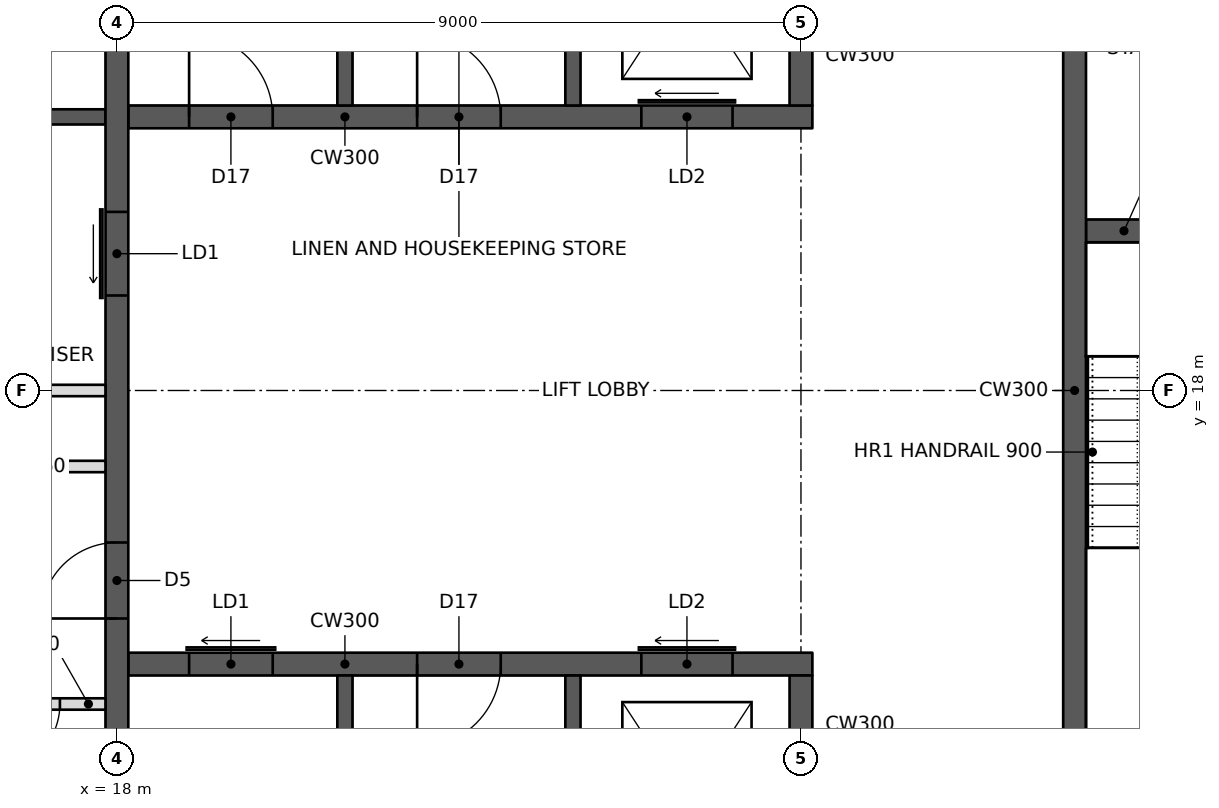
"""IFC4 building model, lengths in metres.
Left out: names, types, materials, properties, quantities, classifications, styles, units other than length and angle.
Written with IfcOpenShell. Run it as: python <this file> out.ifc"""

import sys

from ifc_helpers import new_model, si_unit, direction, frame, frame_2d, origin, place, context, subcontext, project, spatial, rectangle, extrude, element, fill, save


model = new_model("IFC4")
c1 = context("Model", 3, precision=1e-05, world=origin(), true_north=direction((0.0, 1.0)))
c2 = subcontext(c1, "Body", "Model", "MODEL_VIEW")
j1 = project(units=[si_unit("LENGTHUNIT", "METRE"), si_unit("PLANEANGLEUNIT", "RADIAN")], contexts=[c1])
p1 = place(None, origin())
s1 = spatial("IfcSite", under=j1, at=p1, CompositionType="ELEMENT")
p2 = place(p1, origin())
s2 = spatial("IfcBuilding", under=s1, at=p2, CompositionType="ELEMENT")
p3 = place(p2, frame((0.0, 0.0, 211.4)))
s3 = spatial("IfcBuildingStorey", under=s2, at=p3, CompositionType="ELEMENT", Elevation=211.4)
p4 = place(p3, frame((18.0, 11.4, 0.0), z_axis=(0.0, 0.0, 1.0), x_axis=(0.0, 1.0, 0.0)))
e1 = element("IfcWall", 1, at=p4, inside=s3, PredefinedType="SHEAR", context=c2, shape_type="SweptSolid", body=[
    extrude(rectangle(XDim=13.2, YDim=0.3, at=frame_2d((6.6, 0.0))), origin(), (0.0, 0.0, 1.0), 3.4),
])
p5 = place(p4, frame((3.6, 0.0, 0.0)))
e2 = element("IfcOpeningElement", 2, at=p5, cuts=e1, PredefinedType="OPENING", context=c2, shape_type="SweptSolid", body=[
    extrude(rectangle(XDim=1.0, YDim=2.1, at=frame_2d((0.5, 1.05))), frame((0.0, 0.16, 0.0), z_axis=(0.0, -1.0, 0.0), x_axis=(1.0, 0.0, 0.0)), (0.0, 0.0, 1.0), 0.32),
])
p6 = place(p4, frame((7.85, 0.0, 0.0)))
e3 = element("IfcOpeningElement", 3, at=p6, cuts=e1, PredefinedType="OPENING", context=c2, shape_type="SweptSolid", body=[
    extrude(rectangle(XDim=1.1, YDim=2.1, at=frame_2d((0.55, 1.05))), frame((0.0, 0.16, 0.0), z_axis=(0.0, -1.0, 0.0), x_axis=(1.0, 0.0, 0.0)), (0.0, 0.0, 1.0), 0.32),
])
p7 = place(p3, frame((14.55, 18.0, 0.0), z_axis=(0.0, 0.0, 1.0), x_axis=(1.0, 0.0, 0.0)))
e4 = element("IfcWall", 4, at=p7, inside=s3, PredefinedType="PARTITIONING", context=c2, shape_type="SweptSolid", body=[
    extrude(rectangle(XDim=3.3, YDim=0.15, at=frame_2d((1.65, 0.0))), origin(), (0.0, 0.0, 1.0), 3.2),
])
p8 = place(p3, frame((18.15, 14.4, 0.0), z_axis=(0.0, 0.0, 1.0), x_axis=(1.0, 0.0, 0.0)))
e5 = element("IfcWall", 5, at=p8, inside=s3, PredefinedType="SHEAR", context=c2, shape_type="SweptSolid", body=[
    extrude(rectangle(XDim=9.0, YDim=0.3, at=frame_2d((4.5, 0.0))), origin(), (0.0, 0.0, 1.0), 3.4),
])
p9 = place(p8, frame((0.8, 0.0, 0.0)))
e6 = element("IfcOpeningElement", 6, at=p9, cuts=e5, PredefinedType="OPENING", context=c2, shape_type="SweptSolid", body=[
    extrude(rectangle(XDim=1.1, YDim=2.1, at=frame_2d((0.55, 1.05))), frame((0.0, 0.16, 0.0), z_axis=(0.0, -1.0, 0.0), x_axis=(1.0, 0.0, 0.0)), (0.0, 0.0, 1.0), 0.32),
])
p10 = place(p8, frame((6.75, 0.0, 0.0)))
e7 = element("IfcOpeningElement", 7, at=p10, cuts=e5, PredefinedType="OPENING", context=c2, shape_type="SweptSolid", body=[
    extrude(rectangle(XDim=1.2, YDim=2.1, at=frame_2d((0.6, 1.05))), frame((0.0, 0.16, 0.0), z_axis=(0.0, -1.0, 0.0), x_axis=(1.0, 0.0, 0.0)), (0.0, 0.0, 1.0), 0.32),
])
p11 = place(p8, frame((3.8, 0.0, 0.0)))
e8 = element("IfcOpeningElement", 8, at=p11, cuts=e5, PredefinedType="OPENING", context=c2, shape_type="SweptSolid", body=[
    extrude(rectangle(XDim=1.1, YDim=2.1, at=frame_2d((0.55, 1.05))), frame((0.0, 0.16, 0.0), z_axis=(0.0, -1.0, 0.0), x_axis=(1.0, 0.0, 0.0)), (0.0, 0.0, 1.0), 0.32),
])
p12 = place(p3, frame((27.0, 11.4, 0.0), z_axis=(0.0, 0.0, 1.0), x_axis=(0.0, 1.0, 0.0)))
e9 = element("IfcWall", 9, at=p12, inside=s3, PredefinedType="SHEAR", context=c2, shape_type="SweptSolid", body=[
    extrude(rectangle(XDim=2.85, YDim=0.3, at=frame_2d((1.425, 0.0))), origin(), (0.0, 0.0, 1.0), 3.4),
])
for number, where, z_axis, x_axis in (
    (10, (21.0, 11.4, 0.0), (0.0, 0.0, 1.0), (0.0, 1.0, 0.0)),
    (11, (24.0, 11.4, 0.0), (0.0, 0.0, 1.0), (0.0, 1.0, 0.0)),
):
    element("IfcWall", number, at=place(p3, frame(where, z_axis=z_axis, x_axis=x_axis)), inside=s3, PredefinedType="SHEAR", context=c2, shape_type="SweptSolid", body=[
        extrude(rectangle(XDim=2.85, YDim=0.2, at=frame_2d((1.425, 0.0))), origin(), (0.0, 0.0, 1.0), 3.4),
    ])
p13 = place(p3, frame((18.15, 21.6, 0.0), z_axis=(0.0, 0.0, 1.0), x_axis=(1.0, 0.0, 0.0)))
e12 = element("IfcWall", 12, at=p13, inside=s3, PredefinedType="SHEAR", context=c2, shape_type="SweptSolid", body=[
    extrude(rectangle(XDim=9.0, YDim=0.3, at=frame_2d((4.5, 0.0))), origin(), (0.0, 0.0, 1.0), 3.4),
])
p14 = place(p13, frame((6.75, 0.0, 0.0)))
e13 = element("IfcOpeningElement", 13, at=p14, cuts=e12, PredefinedType="OPENING", context=c2, shape_type="SweptSolid", body=[
    extrude(rectangle(XDim=1.2, YDim=2.1, at=frame_2d((0.6, 1.05))), frame((0.0, 0.16, 0.0), z_axis=(0.0, -1.0, 0.0), x_axis=(1.0, 0.0, 0.0)), (0.0, 0.0, 1.0), 0.32),
])
p15 = place(p13, frame((0.8, 0.0, 0.0)))
e14 = element("IfcOpeningElement", 14, at=p15, cuts=e12, PredefinedType="OPENING", context=c2, shape_type="SweptSolid", body=[
    extrude(rectangle(XDim=1.1, YDim=2.1, at=frame_2d((0.55, 1.05))), frame((0.0, 0.16, 0.0), z_axis=(0.0, -1.0, 0.0), x_axis=(1.0, 0.0, 0.0)), (0.0, 0.0, 1.0), 0.32),
])
p16 = place(p13, frame((3.8, 0.0, 0.0)))
e15 = element("IfcOpeningElement", 15, at=p16, cuts=e12, PredefinedType="OPENING", context=c2, shape_type="SweptSolid", body=[
    extrude(rectangle(XDim=1.1, YDim=2.1, at=frame_2d((0.55, 1.05))), frame((0.0, 0.16, 0.0), z_axis=(0.0, -1.0, 0.0), x_axis=(1.0, 0.0, 0.0)), (0.0, 0.0, 1.0), 0.32),
])
p17 = place(p3, frame((27.0, 21.75, 0.0), z_axis=(0.0, 0.0, 1.0), x_axis=(0.0, 1.0, 0.0)))
e16 = element("IfcWall", 16, at=p17, inside=s3, PredefinedType="SHEAR", context=c2, shape_type="SweptSolid", body=[
    extrude(rectangle(XDim=2.85, YDim=0.3, at=frame_2d((1.425, 0.0))), origin(), (0.0, 0.0, 1.0), 3.4),
])
for number, where, z_axis, x_axis in (
    (17, (21.0, 21.75, 0.0), (0.0, 0.0, 1.0), (0.0, 1.0, 0.0)),
    (18, (24.0, 21.75, 0.0), (0.0, 0.0, 1.0), (0.0, 1.0, 0.0)),
):
    element("IfcWall", number, at=place(p3, frame(where, z_axis=z_axis, x_axis=x_axis)), inside=s3, PredefinedType="SHEAR", context=c2, shape_type="SweptSolid", body=[
        extrude(rectangle(XDim=2.85, YDim=0.2, at=frame_2d((1.425, 0.0))), origin(), (0.0, 0.0, 1.0), 3.4),
    ])
p18 = place(p3, frame((30.6, 11.4, 0.0), z_axis=(0.0, 0.0, 1.0), x_axis=(0.0, 1.0, 0.0)))
e19 = element("IfcWall", 19, at=p18, inside=s3, PredefinedType="SHEAR", context=c2, shape_type="SweptSolid", body=[
    extrude(rectangle(XDim=13.2, YDim=0.3, at=frame_2d((6.6, 0.0))), origin(), (0.0, 0.0, 1.0), 3.4),
])
p19 = place(p3, frame((30.75, 20.1, 0.0), z_axis=(0.0, 0.0, 1.0), x_axis=(1.0, 0.0, 0.0)))
e20 = element("IfcWall", 20, at=p19, inside=s3, PredefinedType="SHEAR", context=c2, shape_type="SweptSolid", body=[
    extrude(rectangle(XDim=2.85, YDim=0.3, at=frame_2d((1.425, 0.0))), origin(), (0.0, 0.0, 1.0), 3.4),
])
p20 = place(p19, frame((1.15, 0.0, 0.0)))
e21 = element("IfcOpeningElement", 21, at=p20, cuts=e20, PredefinedType="OPENING", context=c2, shape_type="SweptSolid", body=[
    extrude(rectangle(XDim=1.0, YDim=2.1, at=frame_2d((0.5, 1.05))), frame((0.0, 0.16, 0.0), z_axis=(0.0, -1.0, 0.0), x_axis=(1.0, 0.0, 0.0)), (0.0, 0.0, 1.0), 0.32),
])
p21 = place(p3, frame((14.55, 21.6, 0.0), z_axis=(0.0, 0.0, 1.0), x_axis=(1.0, 0.0, 0.0)))
e22 = element("IfcWall", 22, at=p21, inside=s3, PredefinedType="SHEAR", context=c2, shape_type="SweptSolid", body=[
    extrude(rectangle(XDim=3.3, YDim=0.2, at=frame_2d((1.65, 0.0))), origin(), (0.0, 0.0, 1.0), 3.4),
])
p22 = place(p3, frame((14.55, 17.0, 0.0), z_axis=(0.0, 0.0, 1.0), x_axis=(1.0, 0.0, 0.0)))
e23 = element("IfcWall", 23, at=p22, inside=s3, PredefinedType="PARTITIONING", context=c2, shape_type="SweptSolid", body=[
    extrude(rectangle(XDim=3.3, YDim=0.15, at=frame_2d((1.65, 0.0))), origin(), (0.0, 0.0, 1.0), 3.2),
])
p23 = place(p22, frame((0.3, 0.0, 0.0)))
e24 = element("IfcOpeningElement", 24, at=p23, cuts=e23, PredefinedType="OPENING", context=c2, shape_type="SweptSolid", body=[
    extrude(rectangle(XDim=1.0, YDim=2.1, at=frame_2d((0.5, 1.05))), frame((0.0, 0.085, 0.0), z_axis=(0.0, -1.0, 0.0), x_axis=(1.0, 0.0, 0.0)), (0.0, 0.0, 1.0), 0.17),
])
p24 = place(p3, frame((14.55, 13.875, 0.0), z_axis=(0.0, 0.0, 1.0), x_axis=(1.0, 0.0, 0.0)))
e25 = element("IfcWall", 25, at=p24, inside=s3, PredefinedType="PARTITIONING", context=c2, shape_type="SweptSolid", body=[
    extrude(rectangle(XDim=3.3, YDim=0.15, at=frame_2d((1.65, 0.0))), origin(), (0.0, 0.0, 1.0), 3.2),
])
p25 = place(p24, frame((0.2, 0.0, 0.0)))
e26 = element("IfcOpeningElement", 26, at=p25, cuts=e25, PredefinedType="OPENING", context=c2, shape_type="SweptSolid", body=[
    extrude(rectangle(XDim=0.9, YDim=2.1, at=frame_2d((0.45, 1.05))), frame((0.0, 0.085, 0.0), z_axis=(0.0, -1.0, 0.0), x_axis=(1.0, 0.0, 0.0)), (0.0, 0.0, 1.0), 0.17),
])
p26 = place(p24, frame((1.8, 0.0, 0.0)))
e27 = element("IfcOpeningElement", 27, at=p26, cuts=e25, PredefinedType="OPENING", context=c2, shape_type="SweptSolid", body=[
    extrude(rectangle(XDim=0.9, YDim=2.1, at=frame_2d((0.45, 1.05))), frame((0.0, 0.085, 0.0), z_axis=(0.0, -1.0, 0.0), x_axis=(1.0, 0.0, 0.0)), (0.0, 0.0, 1.0), 0.17),
])
p27 = place(p26, frame((0.9, 0.0, 0.0), z_axis=(0.0, 0.0, 1.0), x_axis=(-1.0, 0.0, 0.0)))
e28 = element("IfcDoor", 28, at=p27, inside=s3, OperationType="SINGLE_SWING_RIGHT", PredefinedType="DOOR", context=c2, shape_type="SweptSolid", body=[
    extrude(rectangle(XDim=0.9, YDim=2.1, at=frame_2d((0.45, 1.05))), frame((0.0, 0.025, 0.0), z_axis=(0.0, -1.0, 0.0), x_axis=(1.0, 0.0, 0.0)), (0.0, 0.0, 1.0), 0.05),
])
fill(e27, e28)
p28 = place(p5, origin())
e29 = element("IfcDoor", 29, at=p28, inside=s3, OperationType="SINGLE_SWING_LEFT", PredefinedType="DOOR", context=c2, shape_type="SweptSolid", body=[
    extrude(rectangle(XDim=1.0, YDim=2.1, at=frame_2d((0.5, 1.05))), frame((0.0, 0.025, 0.0), z_axis=(0.0, -1.0, 0.0), x_axis=(1.0, 0.0, 0.0)), (0.0, 0.0, 1.0), 0.05),
])
fill(e2, e29)
p29 = place(p9, origin())
e30 = element("IfcDoor", 30, at=p29, inside=s3, OperationType="SLIDING_TO_LEFT", PredefinedType="DOOR", context=c2, shape_type="SweptSolid", body=[
    extrude(rectangle(XDim=1.1, YDim=2.1, at=frame_2d((0.55, 1.05))), frame((0.0, 0.025, 0.0), z_axis=(0.0, -1.0, 0.0), x_axis=(1.0, 0.0, 0.0)), (0.0, 0.0, 1.0), 0.05),
])
fill(e6, e30)
p30 = place(p6, origin())
e31 = element("IfcDoor", 31, at=p30, inside=s3, OperationType="SLIDING_TO_LEFT", PredefinedType="DOOR", context=c2, shape_type="SweptSolid", body=[
    extrude(rectangle(XDim=1.1, YDim=2.1, at=frame_2d((0.55, 1.05))), frame((0.0, 0.025, 0.0), z_axis=(0.0, -1.0, 0.0), x_axis=(1.0, 0.0, 0.0)), (0.0, 0.0, 1.0), 0.05),
])
fill(e3, e31)
p31 = place(p10, origin())
e32 = element("IfcDoor", 32, at=p31, inside=s3, OperationType="SLIDING_TO_LEFT", PredefinedType="DOOR", context=c2, shape_type="SweptSolid", body=[
    extrude(rectangle(XDim=1.2, YDim=2.1, at=frame_2d((0.6, 1.05))), frame((0.0, 0.025, 0.0), z_axis=(0.0, -1.0, 0.0), x_axis=(1.0, 0.0, 0.0)), (0.0, 0.0, 1.0), 0.05),
])
fill(e7, e32)
p32 = place(p14, origin())
e33 = element("IfcDoor", 33, at=p32, inside=s3, OperationType="SLIDING_TO_LEFT", PredefinedType="DOOR", context=c2, shape_type="SweptSolid", body=[
    extrude(rectangle(XDim=1.2, YDim=2.1, at=frame_2d((0.6, 1.05))), frame((0.0, 0.025, 0.0), z_axis=(0.0, -1.0, 0.0), x_axis=(1.0, 0.0, 0.0)), (0.0, 0.0, 1.0), 0.05),
])
fill(e13, e33)
p33 = place(p15, origin())
e34 = element("IfcDoor", 34, at=p33, inside=s3, OperationType="SINGLE_SWING_LEFT", PredefinedType="DOOR", context=c2, shape_type="SweptSolid", body=[
    extrude(rectangle(XDim=1.1, YDim=2.1, at=frame_2d((0.55, 1.05))), frame((0.0, 0.025, 0.0), z_axis=(0.0, -1.0, 0.0), x_axis=(1.0, 0.0, 0.0)), (0.0, 0.0, 1.0), 0.05),
])
fill(e14, e34)
p34 = place(p16, origin())
e35 = element("IfcDoor", 35, at=p34, inside=s3, OperationType="SINGLE_SWING_LEFT", PredefinedType="DOOR", context=c2, shape_type="SweptSolid", body=[
    extrude(rectangle(XDim=1.1, YDim=2.1, at=frame_2d((0.55, 1.05))), frame((0.0, 0.025, 0.0), z_axis=(0.0, -1.0, 0.0), x_axis=(1.0, 0.0, 0.0)), (0.0, 0.0, 1.0), 0.05),
])
fill(e15, e35)
p35 = place(p11, frame((1.1, 0.0, 0.0), z_axis=(0.0, 0.0, 1.0), x_axis=(-1.0, 0.0, 0.0)))
e36 = element("IfcDoor", 36, at=p35, inside=s3, OperationType="SINGLE_SWING_RIGHT", PredefinedType="DOOR", context=c2, shape_type="SweptSolid", body=[
    extrude(rectangle(XDim=1.1, YDim=2.1, at=frame_2d((0.55, 1.05))), frame((0.0, 0.025, 0.0), z_axis=(0.0, -1.0, 0.0), x_axis=(1.0, 0.0, 0.0)), (0.0, 0.0, 1.0), 0.05),
])
fill(e8, e36)
save(model, sys.argv[1])
